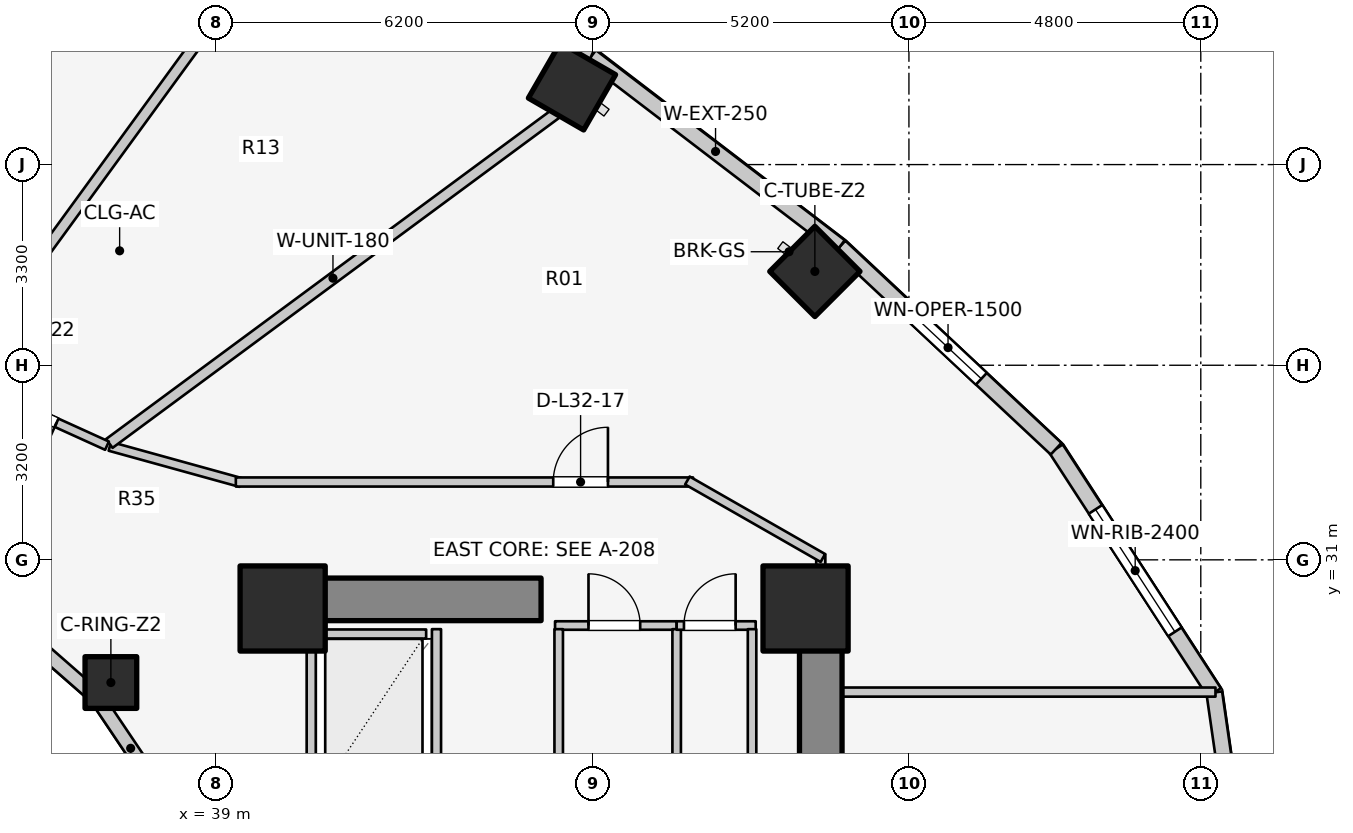
"""IFC4 building model, lengths in metres.
Left out: names, types, materials, properties, quantities, classifications, styles, units other than length and angle.
Written with IfcOpenShell. Run it as: python <this file> out.ifc"""

import sys

from ifc_helpers import new_model, si_unit, direction, frame, frame_2d, origin, origin_2d, place, context, subcontext, project, spatial, rectangle, extrude, element, fill, save


model = new_model("IFC4")
c1 = context("Model", 3, precision=1e-05, world=origin(), true_north=direction((0.0, 1.0)))
c2 = subcontext(c1, "Body", "Model", "MODEL_VIEW")
j1 = project(units=[si_unit("LENGTHUNIT", "METRE"), si_unit("PLANEANGLEUNIT", "RADIAN")], contexts=[c1])
p1 = place(None, origin())
s1 = spatial("IfcSite", under=j1, at=p1, CompositionType="ELEMENT")
p2 = place(p1, origin())
s2 = spatial("IfcBuilding", under=s1, at=p2, CompositionType="ELEMENT")
p3 = place(p2, frame((0.0, 0.0, 107.3)))
s3 = spatial("IfcBuildingStorey", under=s2, at=p3, CompositionType="ELEMENT", Elevation=107.3)
p4 = place(p3, frame((48.95, 17.05, 0.0), z_axis=(0.0, 0.0, 1.0), x_axis=(0.0, 1.0, 0.0)))
e1 = element("IfcWall", 1, at=p4, inside=s3, PredefinedType="SHEAR", context=c2, shape_type="SweptSolid", body=[
    extrude(rectangle(XDim=12.8, YDim=0.7, at=frame_2d((6.4, 0.0))), origin(), (0.0, 0.0, 1.0), 3.1),
])
p5 = place(p3, frame((39.85, 30.35, 0.0), z_axis=(0.0, 0.0, 1.0), x_axis=(1.0, 0.0, 0.0)))
e2 = element("IfcWall", 2, at=p5, inside=s3, PredefinedType="SHEAR", context=c2, shape_type="SweptSolid", body=[
    extrude(rectangle(XDim=4.5, YDim=0.7, at=frame_2d((2.25, 0.0))), origin(), (0.0, 0.0, 1.0), 3.1),
])
for number, where, z_axis, x_axis in (
    (3, (48.7, 30.2, 0.0), (0.0, 0.0, 1.0), (1.0, 0.0, 0.0)),
    (4, (40.1, 30.2, 0.0), (0.0, 0.0, 1.0), (1.0, 0.0, 0.0)),
):
    element("IfcColumn", number, at=place(p3, frame(where, z_axis=z_axis, x_axis=x_axis)), inside=s3, PredefinedType="COLUMN", context=c2, shape_type="SweptSolid", body=[
        extrude(rectangle(XDim=1.4, YDim=1.4, at=origin_2d()), origin(), (0.0, 0.0, 1.0), 3.1),
    ])
p6 = place(p3, frame((37.275, 28.982, 0.0), z_axis=(0.0, 0.0, 1.0), x_axis=(1.0, 0.0, 0.0)))
e5 = element("IfcColumn", 5, at=p6, inside=s3, PredefinedType="COLUMN", context=c2, shape_type="SweptSolid", body=[
    extrude(rectangle(XDim=0.85, YDim=0.85, at=origin_2d()), origin(), (0.0, 0.0, 1.0), 3.1),
])
for number, where, z_axis, x_axis in (
    (6, (48.853, 35.743, 0.0), (0.0, 0.0, 1.0), (0.707, 0.707, 0.0)),
    (7, (44.858, 38.786, 0.0), (0.0, 0.0, 1.0), (0.5, 0.866, 0.0)),
):
    element("IfcColumn", number, at=place(p3, frame(where, z_axis=z_axis, x_axis=x_axis)), inside=s3, PredefinedType="COLUMN", context=c2, shape_type="SweptSolid", body=[
        extrude(rectangle(XDim=1.05, YDim=1.05, at=origin_2d()), origin(), (0.0, 0.0, 1.0), 3.1),
    ])
p7 = place(p3, frame((38.166, 27.06, 0.0), z_axis=(0.0, 0.0, 1.0), x_axis=(-0.558197800898, 0.829707909492, 0.0)))
e8 = element("IfcWall", 8, at=p7, inside=s3, PredefinedType="STANDARD", context=c2, shape_type="SweptSolid", body=[
    extrude(rectangle(XDim=2.027, YDim=0.23, at=frame_2d((1.013, 0.0))), origin(), (0.0, 0.0, 1.0), 2.16),
])
p8 = place(p3, frame((37.035, 28.742, 0.0), z_axis=(0.0, 0.0, 1.0), x_axis=(-0.752576694707, 0.658504607869, 0.0)))
e9 = element("IfcWall", 9, at=p8, inside=s3, PredefinedType="STANDARD", context=c2, shape_type="SweptSolid", body=[
    extrude(rectangle(XDim=1.959, YDim=0.23, at=frame_2d((0.98, 0.0))), origin(), (0.0, 0.0, 1.0), 2.16),
])
p9 = place(p3, frame((56.26, 23.0, 0.0), z_axis=(0.0, 0.0, 1.0), x_axis=(-0.142572472068, 0.98978436551, 0.0)))
e10 = element("IfcWall", 10, at=p9, inside=s3, PredefinedType="STANDARD", context=c2, shape_type="SweptSolid", body=[
    extrude(rectangle(XDim=5.879, YDim=0.26, at=frame_2d((2.939, 0.0))), origin(), (0.0, 0.0, 1.0), 2.85),
])
p10 = place(p9, frame((3.325, 0.0, 0.75)))
e11 = element("IfcOpeningElement", 11, at=p10, cuts=e10, PredefinedType="OPENING", context=c2, shape_type="SweptSolid", body=[
    extrude(rectangle(XDim=1.2, YDim=1.5, at=frame_2d((0.6, 0.75))), frame((0.0, 0.14, 0.0), z_axis=(0.0, -1.0, 0.0), x_axis=(1.0, 0.0, 0.0)), (0.0, 0.0, 1.0), 0.28),
])
p11 = place(p3, frame((55.422, 28.819, 0.0), z_axis=(0.0, 0.0, 1.0), x_axis=(-0.544388392991, 0.838833283541, 0.0)))
e12 = element("IfcWall", 12, at=p11, inside=s3, PredefinedType="STANDARD", context=c2, shape_type="SweptSolid", body=[
    extrude(rectangle(XDim=4.778, YDim=0.26, at=frame_2d((2.389, 0.0))), origin(), (0.0, 0.0, 1.0), 2.85),
])
p12 = place(p11, frame((1.189, 0.0, 0.75)))
e13 = element("IfcOpeningElement", 13, at=p12, cuts=e12, PredefinedType="OPENING", context=c2, shape_type="SweptSolid", body=[
    extrude(rectangle(XDim=2.4, YDim=1.7, at=frame_2d((1.2, 0.85))), frame((0.0, 0.14, 0.0), z_axis=(0.0, -1.0, 0.0), x_axis=(1.0, 0.0, 0.0)), (0.0, 0.0, 1.0), 0.28),
])
p13 = place(p3, frame((52.821, 32.827, 0.0), z_axis=(0.0, 0.0, 1.0), x_axis=(-0.730162452258, 0.68327358599, 0.0)))
e14 = element("IfcWall", 14, at=p13, inside=s3, PredefinedType="STANDARD", context=c2, shape_type="SweptSolid", body=[
    extrude(rectangle(XDim=4.868, YDim=0.26, at=frame_2d((2.434, 0.0))), origin(), (0.0, 0.0, 1.0), 2.85),
])
p14 = place(p13, frame((1.684, 0.0, 0.75)))
e15 = element("IfcOpeningElement", 15, at=p14, cuts=e14, PredefinedType="OPENING", context=c2, shape_type="SweptSolid", body=[
    extrude(rectangle(XDim=1.5, YDim=1.6, at=frame_2d((0.75, 0.8))), frame((0.0, 0.14, 0.0), z_axis=(0.0, -1.0, 0.0), x_axis=(1.0, 0.0, 0.0)), (0.0, 0.0, 1.0), 0.28),
])
p15 = place(p3, frame((49.266, 36.153, 0.0), z_axis=(0.0, 0.0, 1.0), x_axis=(-0.794809810864, 0.606858603427, 0.0)))
e16 = element("IfcWall", 16, at=p15, inside=s3, PredefinedType="STANDARD", context=c2, shape_type="SweptSolid", body=[
    extrude(rectangle(XDim=5.149, YDim=0.26, at=frame_2d((2.575, 0.0))), origin(), (0.0, 0.0, 1.0), 2.85),
])
p16 = place(p3, frame((45.173, 39.278, 0.0), z_axis=(0.0, 0.0, 1.0), x_axis=(-0.914336605747, 0.404955023911, 0.0)))
e17 = element("IfcWall", 17, at=p16, inside=s3, PredefinedType="STANDARD", context=c2, shape_type="SweptSolid", body=[
    extrude(rectangle(XDim=5.859, YDim=0.26, at=frame_2d((2.929, 0.0))), origin(), (0.0, 0.0, 1.0), 2.88),
])
p17 = place(p16, frame((2.329, 0.0, 0.0)))
e18 = element("IfcOpeningElement", 18, at=p17, cuts=e17, PredefinedType="OPENING", context=c2, shape_type="SweptSolid", body=[
    extrude(rectangle(XDim=1.2, YDim=2.2, at=frame_2d((0.6, 1.1))), frame((0.0, 0.14, 0.0), z_axis=(0.0, -1.0, 0.0), x_axis=(1.0, 0.0, 0.0)), (0.0, 0.0, 1.0), 0.28),
])
p18 = place(p3, frame((40.74, 29.78, 0.0), z_axis=(0.0, 0.0, 1.0), x_axis=(1.0, 0.0, 0.0)))
e19 = element("IfcWall", 19, at=p18, inside=s3, PredefinedType="SOLIDWALL", context=c2, shape_type="SweptSolid", body=[
    extrude(rectangle(XDim=1.72, YDim=0.15, at=frame_2d((0.86, 0.0))), origin(), (0.0, 0.0, 1.0), 2.855),
])
for number, where, z_axis, x_axis in (
    (20, (40.57, 27.14, 0.0), (0.0, 0.0, 1.0), (0.0, 1.0, 0.0)),
    (21, (42.63, 27.14, 0.0), (0.0, 0.0, 1.0), (0.0, 1.0, 0.0)),
):
    element("IfcWall", number, at=place(p3, frame(where, z_axis=z_axis, x_axis=x_axis)), inside=s3, PredefinedType="SOLIDWALL", context=c2, shape_type="SweptSolid", body=[
        extrude(rectangle(XDim=2.72, YDim=0.15, at=frame_2d((1.36, 0.0))), origin(), (0.0, 0.0, 1.0), 2.855),
    ])
p19 = place(p3, frame((44.58, 29.92, 0.0), z_axis=(0.0, 0.0, 1.0), x_axis=(1.0, 0.0, 0.0)))
e22 = element("IfcWall", 22, at=p19, inside=s3, PredefinedType="PLUMBINGWALL", context=c2, shape_type="SweptSolid", body=[
    extrude(rectangle(XDim=2.0, YDim=0.14, at=frame_2d((1.0, 0.0))), origin(), (0.0, 0.0, 1.0), 2.855),
])
p20 = place(p19, frame((0.55, 0.0, 0.0)))
e23 = element("IfcOpeningElement", 23, at=p20, cuts=e22, PredefinedType="OPENING", context=c2, shape_type="SweptSolid", body=[
    extrude(rectangle(XDim=0.85, YDim=2.05, at=frame_2d((0.425, 1.025))), frame((0.0, 0.08, 0.0), z_axis=(0.0, -1.0, 0.0), x_axis=(1.0, 0.0, 0.0)), (0.0, 0.0, 1.0), 0.16),
])
for number, where, z_axis, x_axis in (
    (24, (44.64, 25.98, 0.0), (0.0, 0.0, 1.0), (0.0, 1.0, 0.0)),
    (25, (46.58, 25.98, 0.0), (0.0, 0.0, 1.0), (0.0, 1.0, 0.0)),
):
    element("IfcWall", number, at=place(p3, frame(where, z_axis=z_axis, x_axis=x_axis)), inside=s3, PredefinedType="PLUMBINGWALL", context=c2, shape_type="SweptSolid", body=[
        extrude(rectangle(XDim=3.88, YDim=0.14, at=frame_2d((1.94, 0.0))), origin(), (0.0, 0.0, 1.0), 2.855),
    ])
p21 = place(p3, frame((46.58, 29.92, 0.0), z_axis=(0.0, 0.0, 1.0), x_axis=(1.0, 0.0, 0.0)))
e26 = element("IfcWall", 26, at=p21, inside=s3, PredefinedType="PLUMBINGWALL", context=c2, shape_type="SweptSolid", body=[
    extrude(rectangle(XDim=1.3, YDim=0.14, at=frame_2d((0.65, 0.0))), origin(), (0.0, 0.0, 1.0), 2.855),
])
p22 = place(p21, frame((0.12, 0.0, 0.0)))
e27 = element("IfcOpeningElement", 27, at=p22, cuts=e26, PredefinedType="OPENING", context=c2, shape_type="SweptSolid", body=[
    extrude(rectangle(XDim=0.85, YDim=2.05, at=frame_2d((0.425, 1.025))), frame((0.0, 0.08, 0.0), z_axis=(0.0, -1.0, 0.0), x_axis=(1.0, 0.0, 0.0)), (0.0, 0.0, 1.0), 0.16),
])
p23 = place(p3, frame((47.82, 25.98, 0.0), z_axis=(0.0, 0.0, 1.0), x_axis=(0.0, 1.0, 0.0)))
e28 = element("IfcWall", 28, at=p23, inside=s3, PredefinedType="PLUMBINGWALL", context=c2, shape_type="SweptSolid", body=[
    extrude(rectangle(XDim=3.88, YDim=0.14, at=frame_2d((1.94, 0.0))), origin(), (0.0, 0.0, 1.0), 2.855),
])
p24 = place(p3, frame((48.95, 28.825, 0.0), z_axis=(0.0, 0.0, 1.0), x_axis=(1.0, 0.0, 0.0)))
e29 = element("IfcWall", 29, at=p24, inside=s3, PredefinedType="PARTITIONING", context=c2, shape_type="SweptSolid", body=[
    extrude(rectangle(XDim=6.492, YDim=0.15, at=frame_2d((3.246, 0.0))), origin(), (0.0, 0.0, 1.0), 2.855),
])
p25 = place(p3, frame((48.95, 29.8, 0.0), z_axis=(0.0, 0.0, 1.0), x_axis=(0.0, 1.0, 0.0)))
e30 = element("IfcWall", 30, at=p25, inside=s3, PredefinedType="PARTITIONING", context=c2, shape_type="SweptSolid", body=[
    extrude(rectangle(XDim=1.29, YDim=0.15, at=frame_2d((0.645, 0.0))), origin(), (0.0, 0.0, 1.0), 2.142),
])
p26 = place(p3, frame((37.258, 32.867, 0.0), z_axis=(0.0, 0.0, 1.0), x_axis=(0.963833843713, -0.266503886865, 0.0)))
e31 = element("IfcWall", 31, at=p26, inside=s3, PredefinedType="PARTITIONING", context=c2, shape_type="SweptSolid", body=[
    extrude(rectangle(XDim=2.232, YDim=0.15, at=frame_2d((1.116, 0.0))), origin(), (0.0, 0.0, 1.0), 2.272),
])
p27 = place(p3, frame((39.33, 32.28, 0.0), z_axis=(0.0, 0.0, 1.0), x_axis=(1.0, 0.0, 0.0)))
e32 = element("IfcWall", 32, at=p27, inside=s3, PredefinedType="PARTITIONING", context=c2, shape_type="SweptSolid", body=[
    extrude(rectangle(XDim=7.52, YDim=0.15, at=frame_2d((3.76, 0.0))), origin(), (0.0, 0.0, 1.0), 2.272),
])
p28 = place(p27, frame((5.22, 0.0, 0.0)))
e33 = element("IfcOpeningElement", 33, at=p28, cuts=e32, PredefinedType="OPENING", context=c2, shape_type="SweptSolid", body=[
    extrude(rectangle(XDim=0.9, YDim=2.1, at=frame_2d((0.45, 1.05))), frame((0.0, 0.085, 0.0), z_axis=(0.0, -1.0, 0.0), x_axis=(1.0, 0.0, 0.0)), (0.0, 0.0, 1.0), 0.17),
])
p29 = place(p3, frame((46.757, 32.305, 0.0), z_axis=(0.0, 0.0, 1.0), x_axis=(0.867991349648, -0.496579315857, 0.0)))
e34 = element("IfcWall", 34, at=p29, inside=s3, PredefinedType="PARTITIONING", context=c2, shape_type="SweptSolid", body=[
    extrude(rectangle(XDim=2.567, YDim=0.15, at=frame_2d((1.283, 0.0))), origin(), (0.0, 0.0, 1.0), 2.142),
])
p30 = place(p3, frame((37.249, 32.914, 0.0), z_axis=(0.0, 0.0, 1.0), x_axis=(0.80430981394, 0.594210167533, 0.0)))
e35 = element("IfcWall", 35, at=p30, inside=s3, PredefinedType="PARTITIONING", context=c2, shape_type="SweptSolid", body=[
    extrude(rectangle(XDim=9.146, YDim=0.18, at=frame_2d((4.573, 0.0))), origin(), (0.0, 0.0, 1.0), 2.272),
])
p31 = place(p3, frame((34.727, 34.066, 0.0), z_axis=(0.0, 0.0, 1.0), x_axis=(0.589042211476, 0.808102266486, 0.0)))
e36 = element("IfcWall", 36, at=p31, inside=s3, PredefinedType="PARTITIONING", context=c2, shape_type="SweptSolid", body=[
    extrude(rectangle(XDim=8.101, YDim=0.18, at=frame_2d((4.051, 0.0))), origin(), (0.0, 0.0, 1.0), 2.272),
])
p32 = place(p3, frame((37.211, 32.877, 0.0), z_axis=(0.0, 0.0, 1.0), x_axis=(-0.910568469686, 0.41335827319, 0.0)))
e37 = element("IfcWall", 37, at=p32, inside=s3, PredefinedType="PARTITIONING", context=c2, shape_type="SweptSolid", body=[
    extrude(rectangle(XDim=2.772, YDim=0.15, at=frame_2d((1.386, 0.0))), origin(), (0.0, 0.0, 1.0), 2.272),
])
p33 = place(p32, frame((0.911, 0.0, 0.0)))
e38 = element("IfcOpeningElement", 38, at=p33, cuts=e37, PredefinedType="OPENING", context=c2, shape_type="SweptSolid", body=[
    extrude(rectangle(XDim=0.95, YDim=2.1, at=frame_2d((0.475, 1.05))), frame((0.0, 0.085, 0.0), z_axis=(0.0, -1.0, 0.0), x_axis=(1.0, 0.0, 0.0)), (0.0, 0.0, 1.0), 0.17),
])
p34 = place(p12, origin())
e39 = element("IfcWindow", 39, at=p34, inside=s3, PartitioningType="SINGLE_PANEL", PredefinedType="WINDOW", context=c2, shape_type="SweptSolid", body=[
    extrude(rectangle(XDim=2.4, YDim=1.7, at=frame_2d((1.2, 0.85))), frame((0.0, 0.03, 0.0), z_axis=(0.0, -1.0, 0.0), x_axis=(1.0, 0.0, 0.0)), (0.0, 0.0, 1.0), 0.06),
])
fill(e13, e39)
p35 = place(p14, origin())
e40 = element("IfcWindow", 40, at=p35, inside=s3, PartitioningType="SINGLE_PANEL", PredefinedType="WINDOW", context=c2, shape_type="SweptSolid", body=[
    extrude(rectangle(XDim=1.5, YDim=1.6, at=frame_2d((0.75, 0.8))), frame((0.0, 0.03, 0.0), z_axis=(0.0, -1.0, 0.0), x_axis=(1.0, 0.0, 0.0)), (0.0, 0.0, 1.0), 0.06),
])
fill(e15, e40)
p36 = place(p20, origin())
e41 = element("IfcDoor", 41, at=p36, inside=s3, OperationType="SINGLE_SWING_LEFT", PredefinedType="DOOR", context=c2, shape_type="SweptSolid", body=[
    extrude(rectangle(XDim=0.85, YDim=2.05, at=frame_2d((0.425, 1.025))), frame((0.0, 0.025, 0.0), z_axis=(0.0, -1.0, 0.0), x_axis=(1.0, 0.0, 0.0)), (0.0, 0.0, 1.0), 0.05),
])
fill(e23, e41)
p37 = place(p22, origin())
e42 = element("IfcDoor", 42, at=p37, inside=s3, OperationType="SINGLE_SWING_RIGHT", PredefinedType="DOOR", context=c2, shape_type="SweptSolid", body=[
    extrude(rectangle(XDim=0.85, YDim=2.05, at=frame_2d((0.425, 1.025))), frame((0.0, 0.025, 0.0), z_axis=(0.0, -1.0, 0.0), x_axis=(1.0, 0.0, 0.0)), (0.0, 0.0, 1.0), 0.05),
])
fill(e27, e42)
p38 = place(p28, origin())
e43 = element("IfcDoor", 43, at=p38, inside=s3, OperationType="SINGLE_SWING_RIGHT", PredefinedType="DOOR", context=c2, shape_type="SweptSolid", body=[
    extrude(rectangle(XDim=0.9, YDim=2.1, at=frame_2d((0.45, 1.05))), frame((0.0, 0.025, 0.0), z_axis=(0.0, -1.0, 0.0), x_axis=(1.0, 0.0, 0.0)), (0.0, 0.0, 1.0), 0.05),
])
fill(e33, e43)
p39 = place(p33, origin())
e44 = element("IfcDoor", 44, at=p39, inside=s3, OperationType="SINGLE_SWING_LEFT", PredefinedType="DOOR", context=c2, shape_type="SweptSolid", body=[
    extrude(rectangle(XDim=0.95, YDim=2.1, at=frame_2d((0.475, 1.05))), frame((0.0, 0.025, 0.0), z_axis=(0.0, -1.0, 0.0), x_axis=(1.0, 0.0, 0.0)), (0.0, 0.0, 1.0), 0.05),
])
fill(e38, e44)
save(model, sys.argv[1])
